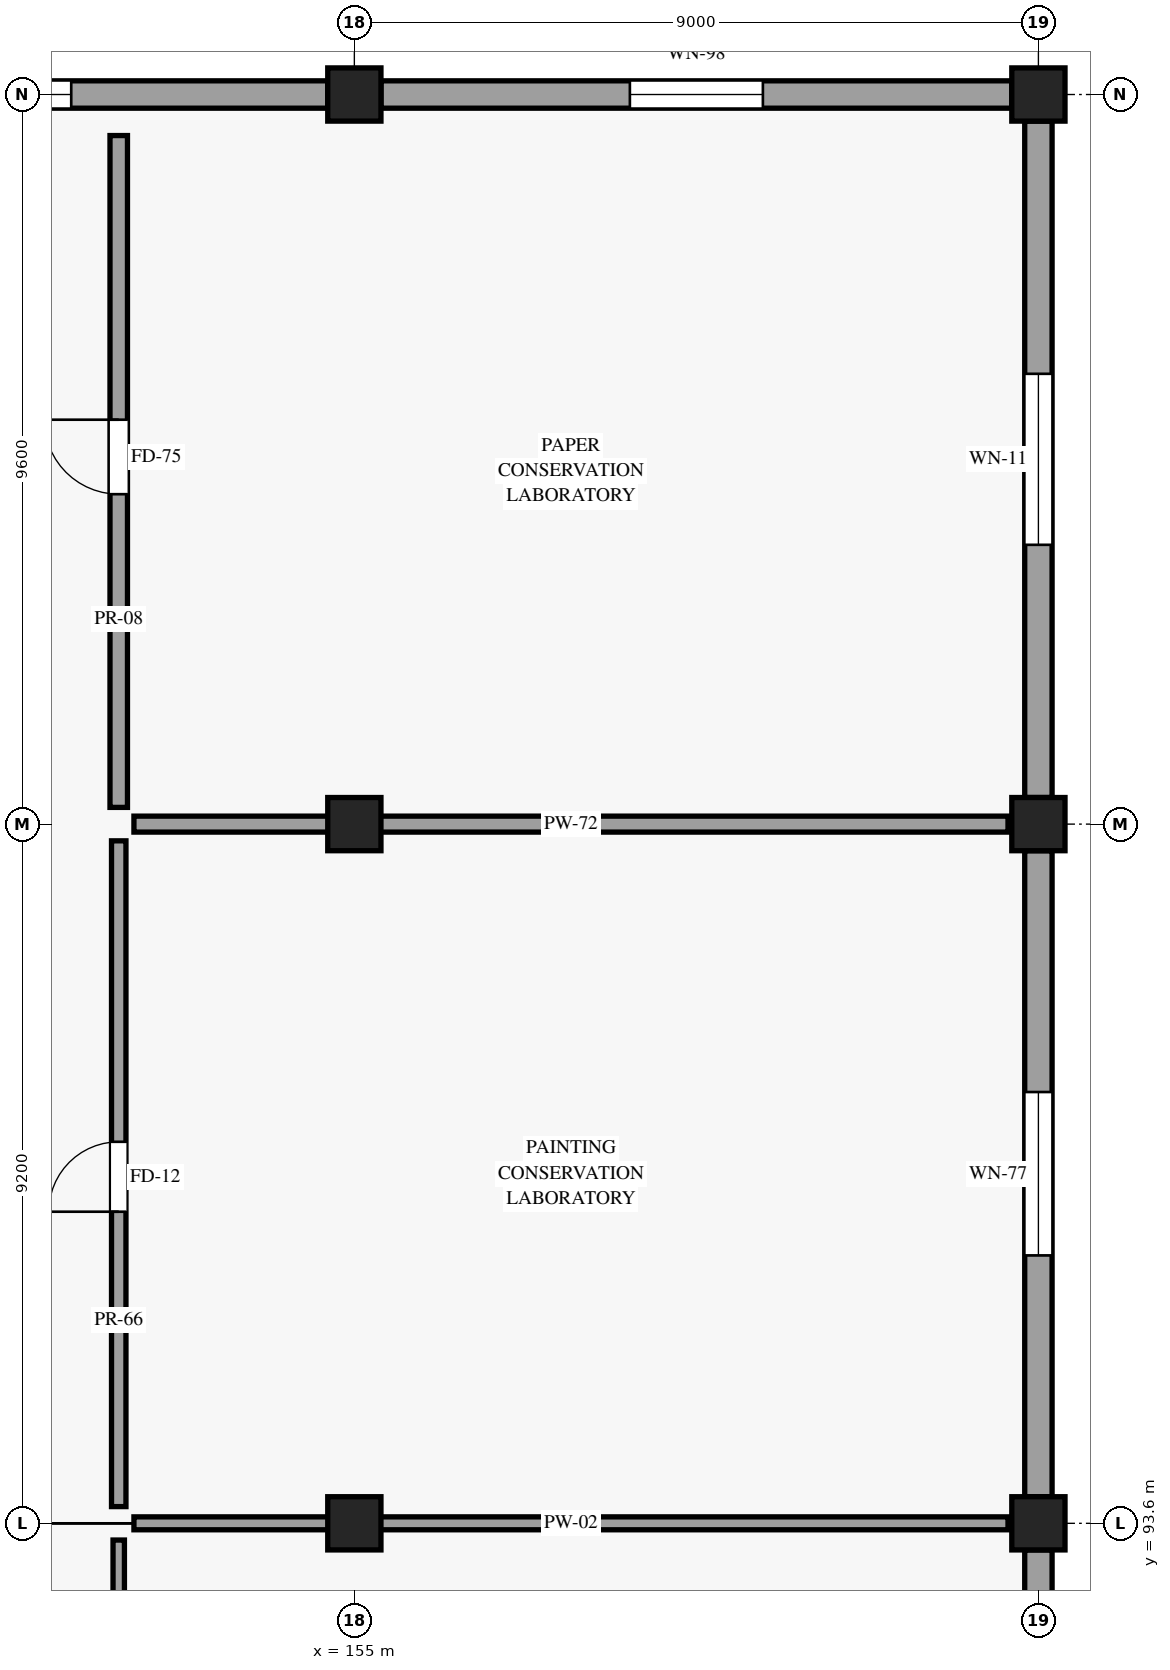
"""IFC4 building model, lengths in metres.
Left out: names, types, materials, properties, quantities, classifications, styles, units other than length and angle.
Written with IfcOpenShell. Run it as: python <this file> out.ifc"""

import sys

from ifc_helpers import new_model, si_unit, direction, frame, frame_2d, origin, origin_2d, place, context, subcontext, project, spatial, rectangle, extrude, element, fill, save


model = new_model("IFC4")
c1 = context("Model", 3, precision=1e-05, world=origin(), true_north=direction((0.0, 1.0)))
c2 = subcontext(c1, "Body", "Model", "MODEL_VIEW")
j1 = project(units=[si_unit("LENGTHUNIT", "METRE"), si_unit("PLANEANGLEUNIT", "RADIAN")], contexts=[c1])
p1 = place(None, origin())
s1 = spatial("IfcSite", under=j1, at=p1, CompositionType="ELEMENT")
p2 = place(p1, origin())
s2 = spatial("IfcBuilding", under=s1, at=p2, CompositionType="ELEMENT")
p3 = place(p2, frame((0.0, 0.0, 5.4)))
s3 = spatial("IfcBuildingStorey", under=s2, at=p3, CompositionType="ELEMENT", Elevation=5.4)
for number, where, z_axis, x_axis in (
    (1, (155.0, 93.6, 0.0), (0.0, 0.0, 1.0), (1.0, 0.0, 0.0)),
    (2, (155.0, 102.8, 0.0), (0.0, 0.0, 1.0), (1.0, 0.0, 0.0)),
    (3, (155.0, 112.4, 0.0), (0.0, 0.0, 1.0), (1.0, 0.0, 0.0)),
    (4, (164.0, 93.6, 0.0), (0.0, 0.0, 1.0), (1.0, 0.0, 0.0)),
    (5, (164.0, 102.8, 0.0), (0.0, 0.0, 1.0), (1.0, 0.0, 0.0)),
    (6, (164.0, 112.4, 0.0), (0.0, 0.0, 1.0), (1.0, 0.0, 0.0)),
):
    element("IfcColumn", number, at=place(p3, frame(where, z_axis=z_axis, x_axis=x_axis)), inside=s3, PredefinedType="COLUMN", context=c2, shape_type="SweptSolid", body=[
        extrude(rectangle(XDim=0.7, YDim=0.7, at=origin_2d()), origin(), (0.0, 0.0, 1.0), 4.8),
    ])
p4 = place(p3, frame((146.35, 112.4, 0.0), z_axis=(0.0, 0.0, 1.0), x_axis=(1.0, 0.0, 0.0)))
e7 = element("IfcWall", 7, at=p4, inside=s3, PredefinedType="STANDARD", context=c2, shape_type="SweptSolid", body=[
    extrude(rectangle(XDim=8.3, YDim=0.36, at=frame_2d((4.15, 0.0))), origin(), (0.0, 0.0, 1.0), 3.175),
])
p5 = place(p4, frame((3.375, 0.0, 0.85)))
e8 = element("IfcOpeningElement", 8, at=p5, cuts=e7, PredefinedType="OPENING", context=c2, shape_type="SweptSolid", body=[
    extrude(rectangle(XDim=1.55, YDim=1.95, at=frame_2d((0.775, 0.975))), frame((0.0, 0.19, 0.0), z_axis=(0.0, -1.0, 0.0), x_axis=(1.0, 0.0, 0.0)), (0.0, 0.0, 1.0), 0.38),
])
p6 = place(p3, frame((155.35, 112.4, 0.0), z_axis=(0.0, 0.0, 1.0), x_axis=(1.0, 0.0, 0.0)))
e9 = element("IfcWall", 9, at=p6, inside=s3, PredefinedType="STANDARD", context=c2, shape_type="SweptSolid", body=[
    extrude(rectangle(XDim=8.3, YDim=0.36, at=frame_2d((4.15, 0.0))), origin(), (0.0, 0.0, 1.0), 3.175),
])
p7 = place(p6, frame((3.275, 0.0, 0.85)))
e10 = element("IfcOpeningElement", 10, at=p7, cuts=e9, PredefinedType="OPENING", context=c2, shape_type="SweptSolid", body=[
    extrude(rectangle(XDim=1.75, YDim=2.05, at=frame_2d((0.875, 1.025))), frame((0.0, 0.19, 0.0), z_axis=(0.0, -1.0, 0.0), x_axis=(1.0, 0.0, 0.0)), (0.0, 0.0, 1.0), 0.38),
])
p8 = place(p3, frame((164.0, 84.75, 0.0), z_axis=(0.0, 0.0, 1.0), x_axis=(0.0, 1.0, 0.0)))
e11 = element("IfcWall", 11, at=p8, inside=s3, PredefinedType="STANDARD", context=c2, shape_type="SweptSolid", body=[
    extrude(rectangle(XDim=8.5, YDim=0.36, at=frame_2d((4.25, 0.0))), origin(), (0.0, 0.0, 1.0), 3.175),
])
p9 = place(p8, frame((5.275, 0.0, 0.85), z_axis=(0.0, 0.0, 1.0), x_axis=(-1.0, 0.0, 0.0)))
e12 = element("IfcOpeningElement", 12, at=p9, cuts=e11, PredefinedType="OPENING", context=c2, shape_type="SweptSolid", body=[
    extrude(rectangle(XDim=2.05, YDim=2.1, at=frame_2d((1.025, 1.05))), frame((0.0, 0.19, 0.0), z_axis=(0.0, -1.0, 0.0), x_axis=(1.0, 0.0, 0.0)), (0.0, 0.0, 1.0), 0.38),
])
p10 = place(p3, frame((164.0, 93.95, 0.0), z_axis=(0.0, 0.0, 1.0), x_axis=(0.0, 1.0, 0.0)))
e13 = element("IfcWall", 13, at=p10, inside=s3, PredefinedType="STANDARD", context=c2, shape_type="SweptSolid", body=[
    extrude(rectangle(XDim=8.5, YDim=0.36, at=frame_2d((4.25, 0.0))), origin(), (0.0, 0.0, 1.0), 3.175),
])
p11 = place(p10, frame((5.325, 0.0, 0.85), z_axis=(0.0, 0.0, 1.0), x_axis=(-1.0, 0.0, 0.0)))
e14 = element("IfcOpeningElement", 14, at=p11, cuts=e13, PredefinedType="OPENING", context=c2, shape_type="SweptSolid", body=[
    extrude(rectangle(XDim=2.15, YDim=2.1, at=frame_2d((1.075, 1.05))), frame((0.0, 0.19, 0.0), z_axis=(0.0, -1.0, 0.0), x_axis=(1.0, 0.0, 0.0)), (0.0, 0.0, 1.0), 0.38),
])
p12 = place(p3, frame((164.0, 103.15, 0.0), z_axis=(0.0, 0.0, 1.0), x_axis=(0.0, 1.0, 0.0)))
e15 = element("IfcWall", 15, at=p12, inside=s3, PredefinedType="STANDARD", context=c2, shape_type="SweptSolid", body=[
    extrude(rectangle(XDim=8.9, YDim=0.36, at=frame_2d((4.45, 0.0))), origin(), (0.0, 0.0, 1.0), 3.175),
])
p13 = place(p12, frame((5.575, 0.0, 0.85), z_axis=(0.0, 0.0, 1.0), x_axis=(-1.0, 0.0, 0.0)))
e16 = element("IfcOpeningElement", 16, at=p13, cuts=e15, PredefinedType="OPENING", context=c2, shape_type="SweptSolid", body=[
    extrude(rectangle(XDim=2.25, YDim=2.1, at=frame_2d((1.125, 1.05))), frame((0.0, 0.19, 0.0), z_axis=(0.0, -1.0, 0.0), x_axis=(1.0, 0.0, 0.0)), (0.0, 0.0, 1.0), 0.38),
])
p14 = place(p3, frame((151.9, 75.42, 0.0), z_axis=(0.0, 0.0, 1.0), x_axis=(0.0, 1.0, 0.0)))
e17 = element("IfcWall", 17, at=p14, inside=s3, PredefinedType="PARTITIONING", context=c2, shape_type="SweptSolid", body=[
    extrude(rectangle(XDim=17.96, YDim=0.15, at=frame_2d((8.98, 0.0))), origin(), (0.0, 0.0, 1.0), 3.175),
])
p15 = place(p14, frame((3.936, 0.0, 0.0)))
e18 = element("IfcOpeningElement", 18, at=p15, cuts=e17, PredefinedType="OPENING", context=c2, shape_type="SweptSolid", body=[
    extrude(rectangle(XDim=1.2, YDim=2.3, at=frame_2d((0.6, 1.15))), frame((0.0, 0.085, 0.0), z_axis=(0.0, -1.0, 0.0), x_axis=(1.0, 0.0, 0.0)), (0.0, 0.0, 1.0), 0.17),
])
p16 = place(p3, frame((152.1, 93.6, 0.0), z_axis=(0.0, 0.0, 1.0), x_axis=(1.0, 0.0, 0.0)))
e19 = element("IfcWall", 19, at=p16, inside=s3, PredefinedType="PARTITIONING", context=c2, shape_type="SweptSolid", body=[
    extrude(rectangle(XDim=11.5, YDim=0.17, at=frame_2d((5.75, 0.0))), origin(), (0.0, 0.0, 1.0), 3.175),
])
p17 = place(p3, frame((151.9, 93.82, 0.0), z_axis=(0.0, 0.0, 1.0), x_axis=(0.0, 1.0, 0.0)))
e20 = element("IfcWall", 20, at=p17, inside=s3, PredefinedType="PARTITIONING", context=c2, shape_type="SweptSolid", body=[
    extrude(rectangle(XDim=8.76, YDim=0.19, at=frame_2d((4.38, 0.0))), origin(), (0.0, 0.0, 1.0), 3.175),
])
p18 = place(p17, frame((3.88, 0.0, 0.0)))
e21 = element("IfcOpeningElement", 21, at=p18, cuts=e20, PredefinedType="OPENING", context=c2, shape_type="SweptSolid", body=[
    extrude(rectangle(XDim=0.92, YDim=2.12, at=frame_2d((0.46, 1.06))), frame((0.0, 0.105, 0.0), z_axis=(0.0, -1.0, 0.0), x_axis=(1.0, 0.0, 0.0)), (0.0, 0.0, 1.0), 0.21),
])
p19 = place(p3, frame((152.1, 102.8, 0.0), z_axis=(0.0, 0.0, 1.0), x_axis=(1.0, 0.0, 0.0)))
e22 = element("IfcWall", 22, at=p19, inside=s3, PredefinedType="PARTITIONING", context=c2, shape_type="SweptSolid", body=[
    extrude(rectangle(XDim=11.5, YDim=0.21, at=frame_2d((5.75, 0.0))), origin(), (0.0, 0.0, 1.0), 3.175),
])
p20 = place(p3, frame((151.9, 103.02, 0.0), z_axis=(0.0, 0.0, 1.0), x_axis=(0.0, 1.0, 0.0)))
e23 = element("IfcWall", 23, at=p20, inside=s3, PredefinedType="PARTITIONING", context=c2, shape_type="SweptSolid", body=[
    extrude(rectangle(XDim=8.84, YDim=0.23, at=frame_2d((4.42, 0.0))), origin(), (0.0, 0.0, 1.0), 3.175),
])
p21 = place(p20, frame((4.121, 0.0, 0.0)))
e24 = element("IfcOpeningElement", 24, at=p21, cuts=e23, PredefinedType="OPENING", context=c2, shape_type="SweptSolid", body=[
    extrude(rectangle(XDim=0.98, YDim=2.18, at=frame_2d((0.49, 1.09))), frame((0.0, 0.125, 0.0), z_axis=(0.0, -1.0, 0.0), x_axis=(1.0, 0.0, 0.0)), (0.0, 0.0, 1.0), 0.25),
])
p22 = place(p5, origin())
e25 = element("IfcWindow", 25, at=p22, inside=s3, PartitioningType="SINGLE_PANEL", PredefinedType="WINDOW", context=c2, shape_type="SweptSolid", body=[
    extrude(rectangle(XDim=1.55, YDim=1.95, at=frame_2d((0.775, 0.975))), frame((0.0, 0.03, 0.0), z_axis=(0.0, -1.0, 0.0), x_axis=(1.0, 0.0, 0.0)), (0.0, 0.0, 1.0), 0.06),
])
fill(e8, e25)
p23 = place(p7, origin())
e26 = element("IfcWindow", 26, at=p23, inside=s3, PartitioningType="SINGLE_PANEL", PredefinedType="WINDOW", context=c2, shape_type="SweptSolid", body=[
    extrude(rectangle(XDim=1.75, YDim=2.05, at=frame_2d((0.875, 1.025))), frame((0.0, 0.03, 0.0), z_axis=(0.0, -1.0, 0.0), x_axis=(1.0, 0.0, 0.0)), (0.0, 0.0, 1.0), 0.06),
])
fill(e10, e26)
p24 = place(p11, origin())
e27 = element("IfcWindow", 27, at=p24, inside=s3, PartitioningType="SINGLE_PANEL", PredefinedType="WINDOW", context=c2, shape_type="SweptSolid", body=[
    extrude(rectangle(XDim=2.15, YDim=2.1, at=frame_2d((1.075, 1.05))), frame((0.0, 0.03, 0.0), z_axis=(0.0, -1.0, 0.0), x_axis=(1.0, 0.0, 0.0)), (0.0, 0.0, 1.0), 0.06),
])
fill(e14, e27)
p25 = place(p13, origin())
e28 = element("IfcWindow", 28, at=p25, inside=s3, PartitioningType="SINGLE_PANEL", PredefinedType="WINDOW", context=c2, shape_type="SweptSolid", body=[
    extrude(rectangle(XDim=2.25, YDim=2.1, at=frame_2d((1.125, 1.05))), frame((0.0, 0.03, 0.0), z_axis=(0.0, -1.0, 0.0), x_axis=(1.0, 0.0, 0.0)), (0.0, 0.0, 1.0), 0.06),
])
fill(e16, e28)
p26 = place(p18, origin())
e29 = element("IfcDoor", 29, at=p26, inside=s3, OperationType="SINGLE_SWING_LEFT", PredefinedType="DOOR", context=c2, shape_type="SweptSolid", body=[
    extrude(rectangle(XDim=0.92, YDim=2.12, at=frame_2d((0.46, 1.06))), frame((0.0, 0.025, 0.0), z_axis=(0.0, -1.0, 0.0), x_axis=(1.0, 0.0, 0.0)), (0.0, 0.0, 1.0), 0.05),
])
fill(e21, e29)
p27 = place(p21, origin())
e30 = element("IfcDoor", 30, at=p27, inside=s3, OperationType="SINGLE_SWING_RIGHT", PredefinedType="DOOR", context=c2, shape_type="SweptSolid", body=[
    extrude(rectangle(XDim=0.98, YDim=2.18, at=frame_2d((0.49, 1.09))), frame((0.0, 0.025, 0.0), z_axis=(0.0, -1.0, 0.0), x_axis=(1.0, 0.0, 0.0)), (0.0, 0.0, 1.0), 0.05),
])
fill(e24, e30)
save(model, sys.argv[1])
